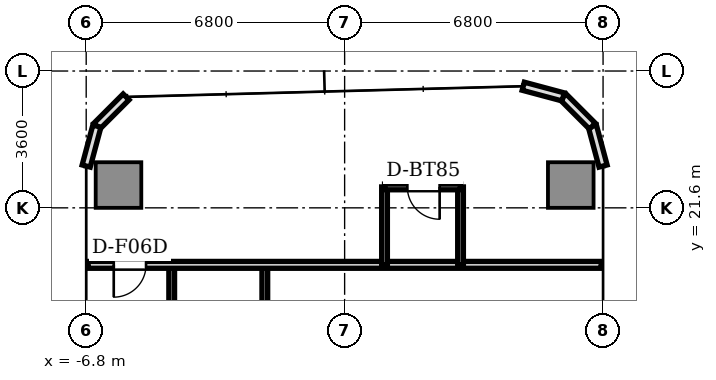
"""IFC4 building model, lengths in metres.
Left out: names, types, materials, properties, quantities, classifications, styles, units other than length and angle.
Written with IfcOpenShell. Run it as: python <this file> out.ifc"""

import sys

from ifc_helpers import new_model, si_unit, direction, frame, frame_2d, origin, origin_2d, place, context, subcontext, project, spatial, rectangle, extrude, source, transform, mapped, element, fill, save


model = new_model("IFC4")
c1 = context("Model", 3, precision=1e-05, world=origin(), true_north=direction((0.0, 1.0)))
c2 = subcontext(c1, "Body", "Model", "MODEL_VIEW")
j1 = project(units=[si_unit("LENGTHUNIT", "METRE"), si_unit("PLANEANGLEUNIT", "RADIAN")], contexts=[c1])
p1 = place(None, origin())
s1 = spatial("IfcSite", under=j1, at=p1, CompositionType="ELEMENT")
p2 = place(p1, origin())
s2 = spatial("IfcBuilding", under=s1, at=p2, CompositionType="ELEMENT")
p3 = place(p2, frame((0.0, 0.0, 43.2)))
s3 = spatial("IfcBuildingStorey", under=s2, at=p3, CompositionType="ELEMENT", Elevation=43.2)
m1 = source(origin(), c2, "Body", "SweptSolid", [
    extrude(rectangle(XDim=1.2, YDim=1.2, at=origin_2d()), origin(), (0.0, 0.0, 1.0), 3.05),
])
for number, where, z_axis, x_axis in (
    (1, (5.95, 22.2, 0.0), (0.0, 0.0, 1.0), (1.0, 0.0, 0.0)),
    (2, (-5.95, 22.2, 0.0), (0.0, 0.0, 1.0), (1.0, 0.0, 0.0)),
):
    element("IfcColumn", number, at=place(p3, frame(where, z_axis=z_axis, x_axis=x_axis)), inside=s3, PredefinedType="COLUMN", context=c2, shape_type="MappedRepresentation", body=[
        mapped(m1, transform((0.0, 0.0, 0.0), scale=1.0)),
    ])
for number, where, z_axis, x_axis in (
    (3, (6.8, 22.7, 0.0), (0.0, 0.0, 1.0), (-0.259, 0.966, 0.0)),
    (4, (6.519, 23.75, 0.0), (0.0, 0.0, 1.0), (-0.707, 0.707, 0.0)),
    (5, (5.75, 24.519, 0.0), (0.0, 0.0, 1.0), (-0.966, 0.259, 0.0)),
    (6, (-5.75, 24.519, 0.0), (0.0, 0.0, 1.0), (-0.707, -0.707, 0.0)),
    (7, (-6.519, 23.75, 0.0), (0.0, 0.0, 1.0), (-0.259, -0.966, 0.0)),
):
    element("IfcWall", number, at=place(p3, frame(where, z_axis=z_axis, x_axis=x_axis)), inside=s3, PredefinedType="STANDARD", context=c2, shape_type="SweptSolid", body=[
        extrude(rectangle(XDim=1.087, YDim=0.22, at=frame_2d((0.543, 0.0))), origin(), (0.0, 0.0, 1.0), 3.05),
    ])
p4 = place(p3, frame((-4.55, 11.35, 0.0), z_axis=(0.0, 0.0, 1.0), x_axis=(0.0, 1.0, 0.0)))
e8 = element("IfcWall", 8, at=p4, inside=s3, PredefinedType="PARTITIONING", context=c2, shape_type="SweptSolid", body=[
    extrude(rectangle(XDim=8.75, YDim=0.15, at=frame_2d((4.375, 0.0))), origin(), (0.0, 0.0, 1.0), 2.57),
])
p5 = place(p4, frame((1.538, 0.0, 0.0)))
e9 = element("IfcOpeningElement", 9, at=p5, cuts=e8, PredefinedType="OPENING", context=c2, shape_type="SweptSolid", body=[
    extrude(rectangle(XDim=0.85, YDim=2.1, at=frame_2d((0.425, 1.05))), frame((0.0, 0.085, 0.0), z_axis=(0.0, -1.0, 0.0), x_axis=(1.0, 0.0, 0.0)), (0.0, 0.0, 1.0), 0.17),
])
p6 = place(p4, frame((4.937, 0.0, 0.0)))
e10 = element("IfcOpeningElement", 10, at=p6, cuts=e8, PredefinedType="OPENING", context=c2, shape_type="SweptSolid", body=[
    extrude(rectangle(XDim=0.85, YDim=2.1, at=frame_2d((0.425, 1.05))), frame((0.0, 0.085, 0.0), z_axis=(0.0, -1.0, 0.0), x_axis=(1.0, 0.0, 0.0)), (0.0, 0.0, 1.0), 0.17),
])
p7 = place(p3, frame((-2.1, 18.05, 0.0), z_axis=(0.0, 0.0, 1.0), x_axis=(0.0, 1.0, 0.0)))
e11 = element("IfcWall", 11, at=p7, inside=s3, PredefinedType="PARTITIONING", context=c2, shape_type="SweptSolid", body=[
    extrude(rectangle(XDim=2.05, YDim=0.15, at=frame_2d((1.025, 0.0))), origin(), (0.0, 0.0, 1.0), 2.6),
])
p8 = place(p3, frame((6.75, 20.1, 0.0), z_axis=(0.0, 0.0, 1.0), x_axis=(-1.0, 0.0, 0.0)))
e12 = element("IfcWall", 12, at=p8, inside=s3, PredefinedType="PARTITIONING", context=c2, shape_type="SweptSolid", body=[
    extrude(rectangle(XDim=13.5, YDim=0.18, at=frame_2d((6.75, 0.0))), origin(), (0.0, 0.0, 1.0), 2.6),
])
p9 = place(p8, frame((11.975, 0.0, 0.0)))
e13 = element("IfcOpeningElement", 13, at=p9, cuts=e12, PredefinedType="OPENING", context=c2, shape_type="SweptSolid", body=[
    extrude(rectangle(XDim=0.85, YDim=2.1, at=frame_2d((0.425, 1.05))), frame((0.0, 0.1, 0.0), z_axis=(0.0, -1.0, 0.0), x_axis=(1.0, 0.0, 0.0)), (0.0, 0.0, 1.0), 0.2),
])
for number, where, z_axis, x_axis in (
    (14, (1.05, 20.1, 0.0), (0.0, 0.0, 1.0), (0.0, 1.0, 0.0)),
    (15, (3.05, 20.1, 0.0), (0.0, 0.0, 1.0), (0.0, 1.0, 0.0)),
):
    element("IfcWall", number, at=place(p3, frame(where, z_axis=z_axis, x_axis=x_axis)), inside=s3, PredefinedType="PARTITIONING", context=c2, shape_type="SweptSolid", body=[
        extrude(rectangle(XDim=2.05, YDim=0.15, at=frame_2d((1.025, 0.0))), origin(), (0.0, 0.0, 1.0), 2.6),
    ])
p10 = place(p3, frame((3.05, 22.15, 0.0), z_axis=(0.0, 0.0, 1.0), x_axis=(-1.0, 0.0, 0.0)))
e16 = element("IfcWall", 16, at=p10, inside=s3, PredefinedType="PARTITIONING", context=c2, shape_type="SweptSolid", body=[
    extrude(rectangle(XDim=2.0, YDim=0.15, at=frame_2d((1.0, 0.0))), origin(), (0.0, 0.0, 1.0), 2.52),
])
p11 = place(p10, frame((0.55, 0.0, 0.0)))
e17 = element("IfcOpeningElement", 17, at=p11, cuts=e16, PredefinedType="OPENING", context=c2, shape_type="SweptSolid", body=[
    extrude(rectangle(XDim=0.85, YDim=2.1, at=frame_2d((0.425, 1.05))), frame((0.0, 0.085, 0.0), z_axis=(0.0, -1.0, 0.0), x_axis=(1.0, 0.0, 0.0)), (0.0, 0.0, 1.0), 0.17),
])
m2 = source(origin(), c2, "Body", "SweptSolid", [
    extrude(rectangle(XDim=0.85, YDim=0.05, at=origin_2d()), origin(), (0.0, 0.0, 1.0), 2.1),
])
p12 = place(p11, frame((0.425, 0.0, 0.0)))
e18 = element("IfcDoor", 18, at=p12, inside=s3, OperationType="SINGLE_SWING_LEFT", PredefinedType="DOOR", context=c2, shape_type="MappedRepresentation", body=[
    mapped(m2, transform((0.0, 0.0, 0.0), scale=1.0)),
])
fill(e17, e18)
p13 = place(p9, frame((0.425, 0.0, 0.0)))
e19 = element("IfcDoor", 19, at=p13, inside=s3, OperationType="SINGLE_SWING_RIGHT", PredefinedType="DOOR", context=c2, shape_type="MappedRepresentation", body=[
    mapped(m2, transform((0.0, 0.0, 0.0), scale=1.0)),
])
fill(e13, e19)
save(model, sys.argv[1])
